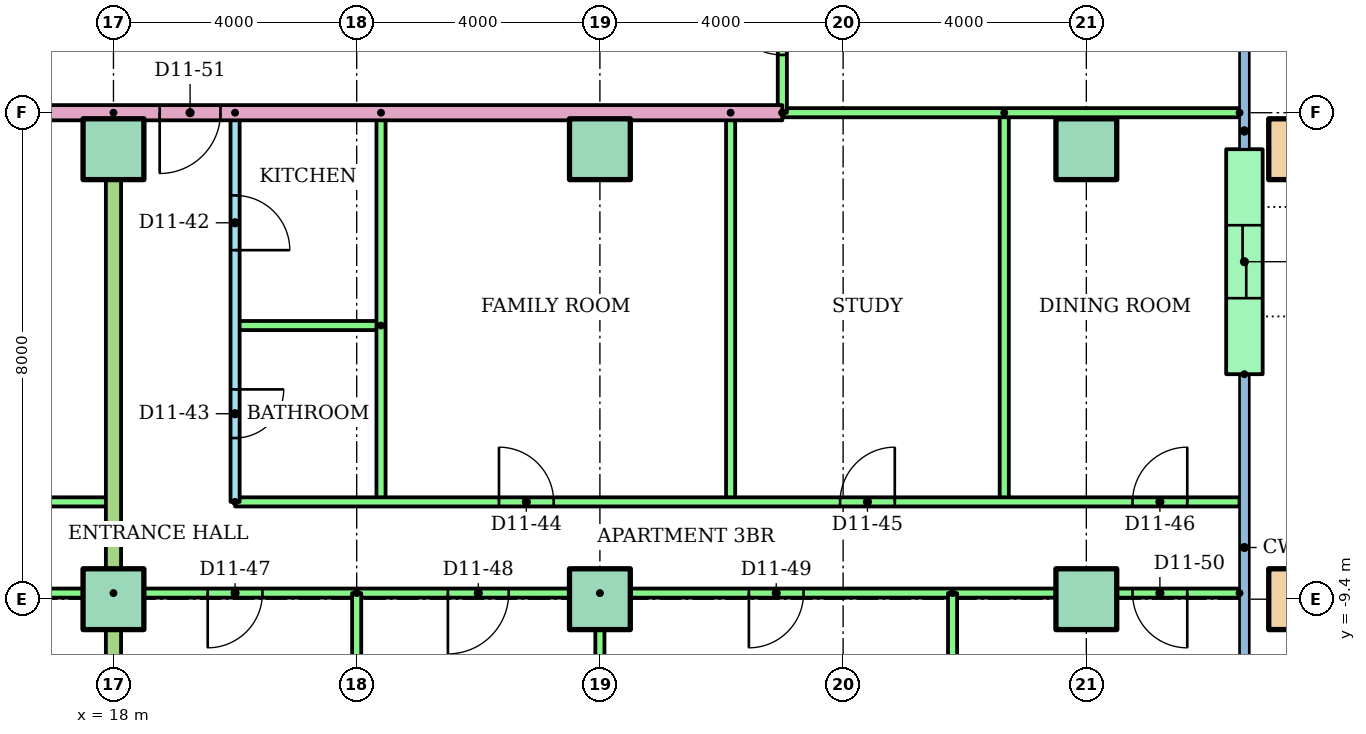
"""IFC4 building model, lengths in metres.
Left out: names, types, materials, properties, quantities, classifications, styles, units other than length and angle.
Written with IfcOpenShell. Run it as: python <this file> out.ifc"""

import sys

from ifc_helpers import new_model, si_unit, direction, frame, frame_2d, origin, origin_2d, place, context, subcontext, project, spatial, rectangle, hollow_rectangle, extrude, element, fill, save


model = new_model("IFC4")
c1 = context("Model", 3, precision=1e-05, world=origin(), true_north=direction((0.0, 1.0)))
c2 = subcontext(c1, "Body", "Model", "MODEL_VIEW")
j1 = project(units=[si_unit("LENGTHUNIT", "METRE"), si_unit("PLANEANGLEUNIT", "RADIAN")], contexts=[c1])
p1 = place(None, origin())
s1 = spatial("IfcSite", under=j1, at=p1, CompositionType="ELEMENT")
p2 = place(p1, origin())
s2 = spatial("IfcBuilding", under=s1, at=p2, CompositionType="ELEMENT")
p3 = place(p2, frame((0.0, 0.0, 44.8)))
s3 = spatial("IfcBuildingStorey", under=s2, at=p3, CompositionType="ELEMENT", Elevation=44.8)
for number, where in (
    (1, (18.0, -9.4, 0.0)),
    (2, (26.0, -9.4, 0.0)),
    (3, (34.0, -9.4, 0.0)),
):
    element("IfcColumn", number, at=place(p3, frame(where)), inside=s3, PredefinedType="COLUMN", context=c2, shape_type="SweptSolid", body=[
        extrude(rectangle(XDim=1.0, YDim=1.0, at=origin_2d()), origin(), (0.0, 0.0, 1.0), 3.2),
    ])
p4 = place(p3, frame((37.5, -9.4, 0.0)))
e4 = element("IfcColumn", 4, at=p4, inside=s3, PredefinedType="COLUMN", context=c2, shape_type="SweptSolid", body=[
    extrude(hollow_rectangle(XDim=1.0, YDim=1.0, WallThickness=0.05, at=origin_2d()), origin(), (0.0, 0.0, 1.0), 3.2),
])
for number, where in (
    (5, (18.0, -2.0, 0.0)),
    (6, (26.0, -2.0, 0.0)),
    (7, (34.0, -2.0, 0.0)),
):
    element("IfcColumn", number, at=place(p3, frame(where)), inside=s3, PredefinedType="COLUMN", context=c2, shape_type="SweptSolid", body=[
        extrude(rectangle(XDim=1.0, YDim=1.0, at=origin_2d()), origin(), (0.0, 0.0, 1.0), 3.2),
    ])
p5 = place(p3, frame((37.5, -2.0, 0.0)))
e8 = element("IfcColumn", 8, at=p5, inside=s3, PredefinedType="COLUMN", context=c2, shape_type="SweptSolid", body=[
    extrude(hollow_rectangle(XDim=1.0, YDim=1.0, WallThickness=0.05, at=origin_2d()), origin(), (0.0, 0.0, 1.0), 3.2),
])
p6 = place(p3, frame((36.6, -5.7, 0.0), z_axis=(0.0, 0.0, 1.0), x_axis=(0.0, 1.0, 0.0)))
e9 = element("IfcWall", 9, at=p6, inside=s3, PredefinedType="STANDARD", context=c2, shape_type="SweptSolid", body=[
    extrude(rectangle(XDim=3.7, YDim=0.6, at=frame_2d((1.85, 0.0))), origin(), (0.0, 0.0, 1.0), 2.92),
])
p7 = place(p6, frame((1.25, 0.0, 0.0)))
e10 = element("IfcOpeningElement", 10, at=p7, cuts=e9, PredefinedType="OPENING", context=c2, shape_type="SweptSolid", body=[
    extrude(rectangle(XDim=1.2, YDim=2.1, at=frame_2d((0.6, 1.05))), frame((0.0, 0.31, 0.0), z_axis=(0.0, -1.0, 0.0), x_axis=(1.0, 0.0, 0.0)), (0.0, 0.0, 1.0), 0.62),
])
p8 = place(p3, frame((4.0, -7.8, 0.0)))
e11 = element("IfcWall", 11, at=p8, inside=s3, PredefinedType="PARTITIONING", context=c2, shape_type="SweptSolid", body=[
    extrude(rectangle(XDim=14.0, YDim=0.15, at=frame_2d((7.0, 0.0))), origin(), (0.0, 0.0, 1.0), 2.4),
])
p9 = place(p8, frame((3.45, 0.0, 0.0)))
e12 = element("IfcOpeningElement", 12, at=p9, cuts=e11, PredefinedType="OPENING", context=c2, shape_type="SweptSolid", body=[
    extrude(rectangle(XDim=0.9, YDim=2.1, at=frame_2d((0.45, 1.05))), frame((0.0, 0.085, 0.0), z_axis=(0.0, -1.0, 0.0), x_axis=(1.0, 0.0, 0.0)), (0.0, 0.0, 1.0), 0.17),
])
p10 = place(p8, frame((6.825, 0.0, 0.0)))
e13 = element("IfcOpeningElement", 13, at=p10, cuts=e11, PredefinedType="OPENING", context=c2, shape_type="SweptSolid", body=[
    extrude(rectangle(XDim=0.9, YDim=2.1, at=frame_2d((0.45, 1.05))), frame((0.0, 0.085, 0.0), z_axis=(0.0, -1.0, 0.0), x_axis=(1.0, 0.0, 0.0)), (0.0, 0.0, 1.0), 0.17),
])
p11 = place(p8, frame((11.125, 0.0, 0.0)))
e14 = element("IfcOpeningElement", 14, at=p11, cuts=e11, PredefinedType="OPENING", context=c2, shape_type="SweptSolid", body=[
    extrude(rectangle(XDim=0.9, YDim=2.1, at=frame_2d((0.45, 1.05))), frame((0.0, 0.085, 0.0), z_axis=(0.0, -1.0, 0.0), x_axis=(1.0, 0.0, 0.0)), (0.0, 0.0, 1.0), 0.17),
])
p12 = place(p3, frame((18.0, -9.3, 0.0), z_axis=(0.0, 0.0, 1.0), x_axis=(-1.0, 0.0, 0.0)))
e15 = element("IfcWall", 15, at=p12, inside=s3, PredefinedType="PARTITIONING", context=c2, shape_type="SweptSolid", body=[
    extrude(rectangle(XDim=16.0, YDim=0.15, at=frame_2d((8.0, 0.0))), origin(), (0.0, 0.0, 1.0), 2.4),
])
p13 = place(p12, frame((11.5, 0.0, 0.0)))
e16 = element("IfcOpeningElement", 16, at=p13, cuts=e15, PredefinedType="OPENING", context=c2, shape_type="SweptSolid", body=[
    extrude(rectangle(XDim=1.0, YDim=2.1, at=frame_2d((0.5, 1.05))), frame((0.0, 0.085, 0.0), z_axis=(0.0, -1.0, 0.0), x_axis=(1.0, 0.0, 0.0)), (0.0, 0.0, 1.0), 0.17),
])
p14 = place(p12, frame((5.55, 0.0, 0.0)))
e17 = element("IfcOpeningElement", 17, at=p14, cuts=e15, PredefinedType="OPENING", context=c2, shape_type="SweptSolid", body=[
    extrude(rectangle(XDim=0.9, YDim=2.1, at=frame_2d((0.45, 1.05))), frame((0.0, 0.085, 0.0), z_axis=(0.0, -1.0, 0.0), x_axis=(1.0, 0.0, 0.0)), (0.0, 0.0, 1.0), 0.17),
])
p15 = place(p12, frame((1.55, 0.0, 0.0)))
e18 = element("IfcOpeningElement", 18, at=p15, cuts=e15, PredefinedType="OPENING", context=c2, shape_type="SweptSolid", body=[
    extrude(rectangle(XDim=0.9, YDim=2.1, at=frame_2d((0.45, 1.05))), frame((0.0, 0.085, 0.0), z_axis=(0.0, -1.0, 0.0), x_axis=(1.0, 0.0, 0.0)), (0.0, 0.0, 1.0), 0.17),
])
p16 = place(p3, frame((20.0, -1.4, 0.0), z_axis=(0.0, 0.0, 1.0), x_axis=(0.0, -1.0, 0.0)))
e19 = element("IfcWall", 19, at=p16, inside=s3, PredefinedType="PARTITIONING", context=c2, shape_type="SweptSolid", body=[
    extrude(rectangle(XDim=6.4, YDim=0.15, at=frame_2d((3.2, 0.0))), origin(), (0.0, 0.0, 1.0), 2.4),
])
p17 = place(p16, frame((1.36, 0.0, 0.0)))
e20 = element("IfcOpeningElement", 20, at=p17, cuts=e19, PredefinedType="OPENING", context=c2, shape_type="SweptSolid", body=[
    extrude(rectangle(XDim=0.9, YDim=2.1, at=frame_2d((0.45, 1.05))), frame((0.0, 0.085, 0.0), z_axis=(0.0, -1.0, 0.0), x_axis=(1.0, 0.0, 0.0)), (0.0, 0.0, 1.0), 0.17),
])
p18 = place(p16, frame((4.55, 0.0, 0.0)))
e21 = element("IfcOpeningElement", 21, at=p18, cuts=e19, PredefinedType="OPENING", context=c2, shape_type="SweptSolid", body=[
    extrude(rectangle(XDim=0.8, YDim=2.1, at=frame_2d((0.4, 1.05))), frame((0.0, 0.085, 0.0), z_axis=(0.0, -1.0, 0.0), x_axis=(1.0, 0.0, 0.0)), (0.0, 0.0, 1.0), 0.17),
])
p19 = place(p3, frame((22.4, -4.9, 0.0), z_axis=(0.0, 0.0, 1.0), x_axis=(-1.0, 0.0, 0.0)))
e22 = element("IfcWall", 22, at=p19, inside=s3, PredefinedType="PARTITIONING", context=c2, shape_type="SweptSolid", body=[
    extrude(rectangle(XDim=2.4, YDim=0.15, at=frame_2d((1.2, 0.0))), origin(), (0.0, 0.0, 1.0), 2.4),
])
for number, where, z_axis, x_axis in (
    (23, (22.4, -1.4, 0.0), (0.0, 0.0, 1.0), (0.0, -1.0, 0.0)),
    (24, (28.15, -1.4, 0.0), (0.0, 0.0, 1.0), (0.0, -1.0, 0.0)),
    (25, (32.65, -1.4, 0.0), (0.0, 0.0, 1.0), (0.0, -1.0, 0.0)),
):
    element("IfcWall", number, at=place(p3, frame(where, z_axis=z_axis, x_axis=x_axis)), inside=s3, PredefinedType="PARTITIONING", context=c2, shape_type="SweptSolid", body=[
        extrude(rectangle(XDim=6.4, YDim=0.15, at=frame_2d((3.2, 0.0))), origin(), (0.0, 0.0, 1.0), 2.4),
    ])
p20 = place(p3, frame((20.0, -7.8, 0.0)))
e26 = element("IfcWall", 26, at=p20, inside=s3, PredefinedType="PARTITIONING", context=c2, shape_type="SweptSolid", body=[
    extrude(rectangle(XDim=16.52, YDim=0.15, at=frame_2d((8.26, 0.0))), origin(), (0.0, 0.0, 1.0), 2.4),
])
p21 = place(p20, frame((4.34, 0.0, 0.0)))
e27 = element("IfcOpeningElement", 27, at=p21, cuts=e26, PredefinedType="OPENING", context=c2, shape_type="SweptSolid", body=[
    extrude(rectangle(XDim=0.9, YDim=2.1, at=frame_2d((0.45, 1.05))), frame((0.0, 0.085, 0.0), z_axis=(0.0, -1.0, 0.0), x_axis=(1.0, 0.0, 0.0)), (0.0, 0.0, 1.0), 0.17),
])
p22 = place(p20, frame((9.95, 0.0, 0.0)))
e28 = element("IfcOpeningElement", 28, at=p22, cuts=e26, PredefinedType="OPENING", context=c2, shape_type="SweptSolid", body=[
    extrude(rectangle(XDim=0.9, YDim=2.1, at=frame_2d((0.45, 1.05))), frame((0.0, 0.085, 0.0), z_axis=(0.0, -1.0, 0.0), x_axis=(1.0, 0.0, 0.0)), (0.0, 0.0, 1.0), 0.17),
])
p23 = place(p20, frame((14.76, 0.0, 0.0)))
e29 = element("IfcOpeningElement", 29, at=p23, cuts=e26, PredefinedType="OPENING", context=c2, shape_type="SweptSolid", body=[
    extrude(rectangle(XDim=0.9, YDim=2.1, at=frame_2d((0.45, 1.05))), frame((0.0, 0.085, 0.0), z_axis=(0.0, -1.0, 0.0), x_axis=(1.0, 0.0, 0.0)), (0.0, 0.0, 1.0), 0.17),
])
p24 = place(p3, frame((36.52, -9.3, 0.0), z_axis=(0.0, 0.0, 1.0), x_axis=(-1.0, 0.0, 0.0)))
e30 = element("IfcWall", 30, at=p24, inside=s3, PredefinedType="PARTITIONING", context=c2, shape_type="SweptSolid", body=[
    extrude(rectangle(XDim=18.52, YDim=0.15, at=frame_2d((9.26, 0.0))), origin(), (0.0, 0.0, 1.0), 2.4),
])
p25 = place(p24, frame((16.07, 0.0, 0.0)))
e31 = element("IfcOpeningElement", 31, at=p25, cuts=e30, PredefinedType="OPENING", context=c2, shape_type="SweptSolid", body=[
    extrude(rectangle(XDim=0.9, YDim=2.1, at=frame_2d((0.45, 1.05))), frame((0.0, 0.085, 0.0), z_axis=(0.0, -1.0, 0.0), x_axis=(1.0, 0.0, 0.0)), (0.0, 0.0, 1.0), 0.17),
])
p26 = place(p24, frame((12.02, 0.0, 0.0)))
e32 = element("IfcOpeningElement", 32, at=p26, cuts=e30, PredefinedType="OPENING", context=c2, shape_type="SweptSolid", body=[
    extrude(rectangle(XDim=1.0, YDim=2.1, at=frame_2d((0.5, 1.05))), frame((0.0, 0.085, 0.0), z_axis=(0.0, -1.0, 0.0), x_axis=(1.0, 0.0, 0.0)), (0.0, 0.0, 1.0), 0.17),
])
p27 = place(p24, frame((7.17, 0.0, 0.0)))
e33 = element("IfcOpeningElement", 33, at=p27, cuts=e30, PredefinedType="OPENING", context=c2, shape_type="SweptSolid", body=[
    extrude(rectangle(XDim=0.9, YDim=2.1, at=frame_2d((0.45, 1.05))), frame((0.0, 0.085, 0.0), z_axis=(0.0, -1.0, 0.0), x_axis=(1.0, 0.0, 0.0)), (0.0, 0.0, 1.0), 0.17),
])
p28 = place(p24, frame((0.86, 0.0, 0.0)))
e34 = element("IfcOpeningElement", 34, at=p28, cuts=e30, PredefinedType="OPENING", context=c2, shape_type="SweptSolid", body=[
    extrude(rectangle(XDim=0.9, YDim=2.1, at=frame_2d((0.45, 1.05))), frame((0.0, 0.085, 0.0), z_axis=(0.0, -1.0, 0.0), x_axis=(1.0, 0.0, 0.0)), (0.0, 0.0, 1.0), 0.17),
])
p29 = place(p3, frame((22.0, -9.3, 0.0), z_axis=(0.0, 0.0, 1.0), x_axis=(0.0, -1.0, 0.0)))
e35 = element("IfcWall", 35, at=p29, inside=s3, PredefinedType="PARTITIONING", context=c2, shape_type="SweptSolid", body=[
    extrude(rectangle(XDim=6.821, YDim=0.15, at=frame_2d((3.411, 0.0))), origin(), (0.0, 0.0, 1.0), 2.4),
])
p30 = place(p3, frame((26.0, -9.3, 0.0), z_axis=(0.0, 0.0, 1.0), x_axis=(0.0, -1.0, 0.0)))
e36 = element("IfcWall", 36, at=p30, inside=s3, PredefinedType="PARTITIONING", context=c2, shape_type="SweptSolid", body=[
    extrude(rectangle(XDim=6.81, YDim=0.15, at=frame_2d((3.405, 0.0))), origin(), (0.0, 0.0, 1.0), 2.4),
])
p31 = place(p3, frame((31.8, -9.3, 0.0), z_axis=(0.0, 0.0, 1.0), x_axis=(0.0, -1.0, 0.0)))
e37 = element("IfcWall", 37, at=p31, inside=s3, PredefinedType="PARTITIONING", context=c2, shape_type="SweptSolid", body=[
    extrude(rectangle(XDim=5.02, YDim=0.15, at=frame_2d((2.51, 0.0))), origin(), (0.0, 0.0, 1.0), 2.4),
])
p32 = place(p3, frame((18.0, -1.4, 0.0), z_axis=(0.0, 0.0, 1.0), x_axis=(0.0, -1.0, 0.0)))
e38 = element("IfcWall", 38, at=p32, inside=s3, PredefinedType="PARTITIONING", context=c2, shape_type="SweptSolid", body=[
    extrude(rectangle(XDim=14.71, YDim=0.25, at=frame_2d((7.355, 0.0))), origin(), (0.0, 0.0, 1.0), 2.4),
])
p33 = place(p3, frame((29.0, -1.4, 0.0), z_axis=(0.0, 0.0, 1.0), x_axis=(-1.0, 0.0, 0.0)))
e39 = element("IfcWall", 39, at=p33, inside=s3, PredefinedType="PARTITIONING", context=c2, shape_type="SweptSolid", body=[
    extrude(rectangle(XDim=15.0, YDim=0.25, at=frame_2d((7.5, 0.0))), origin(), (0.0, 0.0, 1.0), 2.4),
])
p34 = place(p33, frame((9.24, 0.0, 0.0)))
e40 = element("IfcOpeningElement", 40, at=p34, cuts=e39, PredefinedType="OPENING", context=c2, shape_type="SweptSolid", body=[
    extrude(rectangle(XDim=1.0, YDim=2.1, at=frame_2d((0.5, 1.05))), frame((0.0, 0.135, 0.0), z_axis=(0.0, -1.0, 0.0), x_axis=(1.0, 0.0, 0.0)), (0.0, 0.0, 1.0), 0.27),
])
p35 = place(p3, frame((36.52, -1.4, 0.0), z_axis=(0.0, 0.0, 1.0), x_axis=(-1.0, 0.0, 0.0)))
e41 = element("IfcWall", 41, at=p35, inside=s3, PredefinedType="PARTITIONING", context=c2, shape_type="SweptSolid", body=[
    extrude(rectangle(XDim=7.52, YDim=0.15, at=frame_2d((3.76, 0.0))), origin(), (0.0, 0.0, 1.0), 2.4),
])
p36 = place(p3, frame((29.0, -1.4, 0.0), z_axis=(0.0, 0.0, 1.0), x_axis=(0.0, 1.0, 0.0)))
e42 = element("IfcWall", 42, at=p36, inside=s3, PredefinedType="PARTITIONING", context=c2, shape_type="SweptSolid", body=[
    extrude(rectangle(XDim=2.8, YDim=0.15, at=frame_2d((1.4, 0.0))), origin(), (0.0, 0.0, 1.0), 2.4),
])
p37 = place(p36, frame((0.95, 0.0, 0.0)))
e43 = element("IfcOpeningElement", 43, at=p37, cuts=e42, PredefinedType="OPENING", context=c2, shape_type="SweptSolid", body=[
    extrude(rectangle(XDim=0.9, YDim=2.1, at=frame_2d((0.45, 1.05))), frame((0.0, 0.085, 0.0), z_axis=(0.0, -1.0, 0.0), x_axis=(1.0, 0.0, 0.0)), (0.0, 0.0, 1.0), 0.17),
])
p38 = place(p17, origin())
e44 = element("IfcDoor", 44, at=p38, inside=s3, OperationType="SINGLE_SWING_RIGHT", PredefinedType="DOOR", context=c2, shape_type="SweptSolid", body=[
    extrude(rectangle(XDim=0.9, YDim=2.1, at=frame_2d((0.45, 1.05))), frame((0.0, 0.025, 0.0), z_axis=(0.0, -1.0, 0.0), x_axis=(1.0, 0.0, 0.0)), (0.0, 0.0, 1.0), 0.05),
])
fill(e20, e44)
p39 = place(p18, origin())
e45 = element("IfcDoor", 45, at=p39, inside=s3, OperationType="SINGLE_SWING_LEFT", PredefinedType="DOOR", context=c2, shape_type="SweptSolid", body=[
    extrude(rectangle(XDim=0.8, YDim=2.1, at=frame_2d((0.4, 1.05))), frame((0.0, 0.025, 0.0), z_axis=(0.0, -1.0, 0.0), x_axis=(1.0, 0.0, 0.0)), (0.0, 0.0, 1.0), 0.05),
])
fill(e21, e45)
p40 = place(p21, origin())
e46 = element("IfcDoor", 46, at=p40, inside=s3, OperationType="SINGLE_SWING_LEFT", PredefinedType="DOOR", context=c2, shape_type="SweptSolid", body=[
    extrude(rectangle(XDim=0.9, YDim=2.1, at=frame_2d((0.45, 1.05))), frame((0.0, 0.025, 0.0), z_axis=(0.0, -1.0, 0.0), x_axis=(1.0, 0.0, 0.0)), (0.0, 0.0, 1.0), 0.05),
])
fill(e27, e46)
p41 = place(p22, origin())
e47 = element("IfcDoor", 47, at=p41, inside=s3, OperationType="SINGLE_SWING_RIGHT", PredefinedType="DOOR", context=c2, shape_type="SweptSolid", body=[
    extrude(rectangle(XDim=0.9, YDim=2.1, at=frame_2d((0.45, 1.05))), frame((0.0, 0.025, 0.0), z_axis=(0.0, -1.0, 0.0), x_axis=(1.0, 0.0, 0.0)), (0.0, 0.0, 1.0), 0.05),
])
fill(e28, e47)
p42 = place(p23, origin())
e48 = element("IfcDoor", 48, at=p42, inside=s3, OperationType="SINGLE_SWING_RIGHT", PredefinedType="DOOR", context=c2, shape_type="SweptSolid", body=[
    extrude(rectangle(XDim=0.9, YDim=2.1, at=frame_2d((0.45, 1.05))), frame((0.0, 0.025, 0.0), z_axis=(0.0, -1.0, 0.0), x_axis=(1.0, 0.0, 0.0)), (0.0, 0.0, 1.0), 0.05),
])
fill(e29, e48)
p43 = place(p25, origin())
e49 = element("IfcDoor", 49, at=p43, inside=s3, OperationType="SINGLE_SWING_RIGHT", PredefinedType="DOOR", context=c2, shape_type="SweptSolid", body=[
    extrude(rectangle(XDim=0.9, YDim=2.1, at=frame_2d((0.45, 1.05))), frame((0.0, 0.025, 0.0), z_axis=(0.0, -1.0, 0.0), x_axis=(1.0, 0.0, 0.0)), (0.0, 0.0, 1.0), 0.05),
])
fill(e31, e49)
p44 = place(p26, origin())
e50 = element("IfcDoor", 50, at=p44, inside=s3, OperationType="SINGLE_SWING_RIGHT", PredefinedType="DOOR", context=c2, shape_type="SweptSolid", body=[
    extrude(rectangle(XDim=1.0, YDim=2.1, at=frame_2d((0.5, 1.05))), frame((0.0, 0.025, 0.0), z_axis=(0.0, -1.0, 0.0), x_axis=(1.0, 0.0, 0.0)), (0.0, 0.0, 1.0), 0.05),
])
fill(e32, e50)
p45 = place(p27, origin())
e51 = element("IfcDoor", 51, at=p45, inside=s3, OperationType="SINGLE_SWING_RIGHT", PredefinedType="DOOR", context=c2, shape_type="SweptSolid", body=[
    extrude(rectangle(XDim=0.9, YDim=2.1, at=frame_2d((0.45, 1.05))), frame((0.0, 0.025, 0.0), z_axis=(0.0, -1.0, 0.0), x_axis=(1.0, 0.0, 0.0)), (0.0, 0.0, 1.0), 0.05),
])
fill(e33, e51)
p46 = place(p28, origin())
e52 = element("IfcDoor", 52, at=p46, inside=s3, OperationType="SINGLE_SWING_LEFT", PredefinedType="DOOR", context=c2, shape_type="SweptSolid", body=[
    extrude(rectangle(XDim=0.9, YDim=2.1, at=frame_2d((0.45, 1.05))), frame((0.0, 0.025, 0.0), z_axis=(0.0, -1.0, 0.0), x_axis=(1.0, 0.0, 0.0)), (0.0, 0.0, 1.0), 0.05),
])
fill(e34, e52)
p47 = place(p34, origin())
e53 = element("IfcDoor", 53, at=p47, inside=s3, OperationType="SINGLE_SWING_RIGHT", PredefinedType="DOOR", context=c2, shape_type="SweptSolid", body=[
    extrude(rectangle(XDim=1.0, YDim=2.1, at=frame_2d((0.5, 1.05))), frame((0.0, 0.025, 0.0), z_axis=(0.0, -1.0, 0.0), x_axis=(1.0, 0.0, 0.0)), (0.0, 0.0, 1.0), 0.05),
])
fill(e40, e53)
p48 = place(p37, origin())
e54 = element("IfcDoor", 54, at=p48, inside=s3, OperationType="SINGLE_SWING_RIGHT", PredefinedType="DOOR", context=c2, shape_type="SweptSolid", body=[
    extrude(rectangle(XDim=0.9, YDim=2.1, at=frame_2d((0.45, 1.05))), frame((0.0, 0.025, 0.0), z_axis=(0.0, -1.0, 0.0), x_axis=(1.0, 0.0, 0.0)), (0.0, 0.0, 1.0), 0.05),
])
fill(e43, e54)
p49 = place(p7, origin())
e55 = element("IfcDoor", 55, at=p49, inside=s3, OperationType="SLIDING_TO_LEFT", PredefinedType="DOOR", context=c2, shape_type="SweptSolid", body=[
    extrude(rectangle(XDim=1.2, YDim=2.1, at=frame_2d((0.6, 1.05))), frame((0.0, 0.025, 0.0), z_axis=(0.0, -1.0, 0.0), x_axis=(1.0, 0.0, 0.0)), (0.0, 0.0, 1.0), 0.05),
])
fill(e10, e55)
save(model, sys.argv[1])
